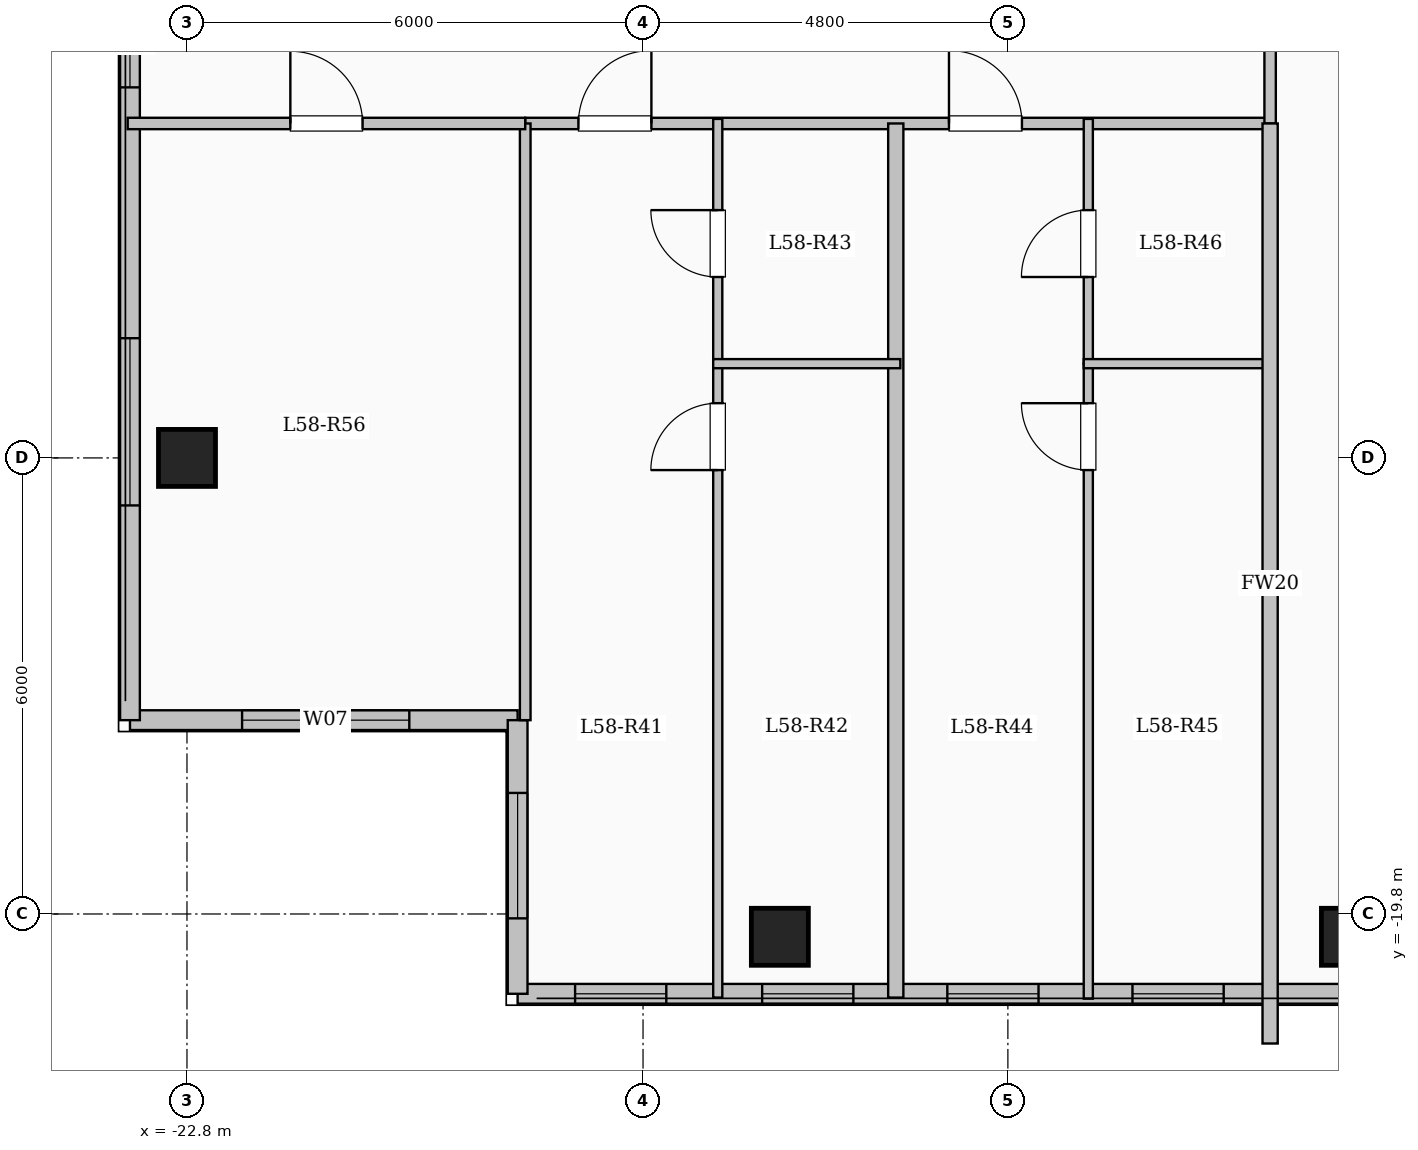
"""IFC4 building model, lengths in metres.
Left out: names, types, materials, properties, quantities, classifications, styles, units other than length and angle.
Written with IfcOpenShell. Run it as: python <this file> out.ifc"""

import sys

from ifc_helpers import new_model, si_unit, direction, frame, frame_2d, origin, origin_2d, place, context, subcontext, project, spatial, rectangle, extrude, element, fill, save


model = new_model("IFC4")
c1 = context("Model", 3, precision=1e-05, world=origin(), true_north=direction((0.0, 1.0)))
c2 = subcontext(c1, "Body", "Model", "MODEL_VIEW")
j1 = project(units=[si_unit("LENGTHUNIT", "METRE"), si_unit("PLANEANGLEUNIT", "RADIAN")], contexts=[c1])
p1 = place(None, origin())
s1 = spatial("IfcSite", under=j1, at=p1, CompositionType="ELEMENT")
p2 = place(p1, origin())
s2 = spatial("IfcBuilding", under=s1, at=p2, CompositionType="ELEMENT")
p3 = place(p2, frame((0.0, 0.0, 213.7)))
s3 = spatial("IfcBuildingStorey", under=s2, at=p3, CompositionType="ELEMENT", Elevation=213.7)
for number, where, z_axis, x_axis in (
    (1, (-15.0, -20.1, 0.0), (0.0, 0.0, 1.0), (1.0, 0.0, 0.0)),
    (2, (-7.5, -20.1, 0.0), (0.0, 0.0, 1.0), (1.0, 0.0, 0.0)),
    (3, (-22.8, -13.8, 0.0), (0.0, 0.0, 1.0), (1.0, 0.0, 0.0)),
):
    element("IfcColumn", number, at=place(p3, frame(where, z_axis=z_axis, x_axis=x_axis)), inside=s3, PredefinedType="COLUMN", context=c2, shape_type="SweptSolid", body=[
        extrude(rectangle(XDim=0.75, YDim=0.75, at=origin_2d()), origin(), (0.0, 0.0, 1.0), 3.35),
    ])
p4 = place(p3, frame((-18.45, -17.25, 0.0), z_axis=(0.0, 0.0, 1.0), x_axis=(-1.0, 0.0, 0.0)))
e4 = element("IfcWall", 4, at=p4, inside=s3, PredefinedType="SOLIDWALL", context=c2, shape_type="SweptSolid", body=[
    extrude(rectangle(XDim=5.1, YDim=0.26, at=frame_2d((2.55, 0.0))), origin(), (0.0, 0.0, 1.0), 3.1),
])
p5 = place(p4, frame((1.425, 0.0, 0.9)))
e5 = element("IfcOpeningElement", 5, at=p5, cuts=e4, PredefinedType="OPENING", context=c2, shape_type="SweptSolid", body=[
    extrude(rectangle(XDim=2.2, YDim=1.75, at=frame_2d((1.1, 0.875))), frame((0.0, 0.14, 0.0), z_axis=(0.0, -1.0, 0.0), x_axis=(1.0, 0.0, 0.0)), (0.0, 0.0, 1.0), 0.28),
])
p6 = place(p3, frame((-23.55, -17.25, 0.0), z_axis=(0.0, 0.0, 1.0), x_axis=(0.0, 1.0, 0.0)))
e6 = element("IfcWall", 6, at=p6, inside=s3, PredefinedType="SOLIDWALL", context=c2, shape_type="SweptSolid", body=[
    extrude(rectangle(XDim=34.5, YDim=0.26, at=frame_2d((17.25, 0.0))), origin(), (0.0, 0.0, 1.0), 3.1),
])
p7 = place(p6, frame((2.825, 0.0, 0.9)))
e7 = element("IfcOpeningElement", 7, at=p7, cuts=e6, PredefinedType="OPENING", context=c2, shape_type="SweptSolid", body=[
    extrude(rectangle(XDim=2.2, YDim=1.75, at=frame_2d((1.1, 0.875))), frame((0.0, 0.14, 0.0), z_axis=(0.0, -1.0, 0.0), x_axis=(1.0, 0.0, 0.0)), (0.0, 0.0, 1.0), 0.28),
])
p8 = place(p6, frame((8.325, 0.0, 0.95)))
e8 = element("IfcOpeningElement", 8, at=p8, cuts=e6, PredefinedType="OPENING", context=c2, shape_type="SweptSolid", body=[
    extrude(rectangle(XDim=1.2, YDim=1.5, at=frame_2d((0.6, 0.75))), frame((0.0, 0.14, 0.0), z_axis=(0.0, -1.0, 0.0), x_axis=(1.0, 0.0, 0.0)), (0.0, 0.0, 1.0), 0.28),
])
p9 = place(p6, frame((18.0, 0.0, 0.9)))
e9 = element("IfcOpeningElement", 9, at=p9, cuts=e6, PredefinedType="OPENING", context=c2, shape_type="SweptSolid", body=[
    extrude(rectangle(XDim=2.0, YDim=1.7, at=frame_2d((1.0, 0.85))), frame((0.0, 0.14, 0.0), z_axis=(0.0, -1.0, 0.0), x_axis=(1.0, 0.0, 0.0)), (0.0, 0.0, 1.0), 0.28),
])
p10 = place(p6, frame((28.375, 0.0, 0.95)))
e10 = element("IfcOpeningElement", 10, at=p10, cuts=e6, PredefinedType="OPENING", context=c2, shape_type="SweptSolid", body=[
    extrude(rectangle(XDim=1.0, YDim=1.5, at=frame_2d((0.5, 0.75))), frame((0.0, 0.14, 0.0), z_axis=(0.0, -1.0, 0.0), x_axis=(1.0, 0.0, 0.0)), (0.0, 0.0, 1.0), 0.28),
])
p11 = place(p6, frame((31.125, 0.0, 0.9)))
e11 = element("IfcOpeningElement", 11, at=p11, cuts=e6, PredefinedType="OPENING", context=c2, shape_type="SweptSolid", body=[
    extrude(rectangle(XDim=2.0, YDim=1.7, at=frame_2d((1.0, 0.85))), frame((0.0, 0.14, 0.0), z_axis=(0.0, -1.0, 0.0), x_axis=(1.0, 0.0, 0.0)), (0.0, 0.0, 1.0), 0.28),
])
p12 = place(p3, frame((-7.35, -20.85, 0.0), z_axis=(0.0, 0.0, 1.0), x_axis=(-1.0, 0.0, 0.0)))
e12 = element("IfcWall", 12, at=p12, inside=s3, PredefinedType="SOLIDWALL", context=c2, shape_type="SweptSolid", body=[
    extrude(rectangle(XDim=11.1, YDim=0.26, at=frame_2d((5.55, 0.0))), origin(), (0.0, 0.0, 1.0), 3.1),
])
p13 = place(p12, frame((1.811, 0.0, 0.95)))
e13 = element("IfcOpeningElement", 13, at=p13, cuts=e12, PredefinedType="OPENING", context=c2, shape_type="SweptSolid", body=[
    extrude(rectangle(XDim=1.2, YDim=1.5, at=frame_2d((0.6, 0.75))), frame((0.0, 0.14, 0.0), z_axis=(0.0, -1.0, 0.0), x_axis=(1.0, 0.0, 0.0)), (0.0, 0.0, 1.0), 0.28),
])
p14 = place(p12, frame((4.247, 0.0, 0.95)))
e14 = element("IfcOpeningElement", 14, at=p14, cuts=e12, PredefinedType="OPENING", context=c2, shape_type="SweptSolid", body=[
    extrude(rectangle(XDim=1.2, YDim=1.5, at=frame_2d((0.6, 0.75))), frame((0.0, 0.14, 0.0), z_axis=(0.0, -1.0, 0.0), x_axis=(1.0, 0.0, 0.0)), (0.0, 0.0, 1.0), 0.28),
])
p15 = place(p12, frame((6.683, 0.0, 0.95)))
e15 = element("IfcOpeningElement", 15, at=p15, cuts=e12, PredefinedType="OPENING", context=c2, shape_type="SweptSolid", body=[
    extrude(rectangle(XDim=1.2, YDim=1.5, at=frame_2d((0.6, 0.75))), frame((0.0, 0.14, 0.0), z_axis=(0.0, -1.0, 0.0), x_axis=(1.0, 0.0, 0.0)), (0.0, 0.0, 1.0), 0.28),
])
p16 = place(p12, frame((9.144, 0.0, 0.95)))
e16 = element("IfcOpeningElement", 16, at=p16, cuts=e12, PredefinedType="OPENING", context=c2, shape_type="SweptSolid", body=[
    extrude(rectangle(XDim=1.2, YDim=1.5, at=frame_2d((0.6, 0.75))), frame((0.0, 0.14, 0.0), z_axis=(0.0, -1.0, 0.0), x_axis=(1.0, 0.0, 0.0)), (0.0, 0.0, 1.0), 0.28),
])
p17 = place(p3, frame((-18.45, -20.85, 0.0), z_axis=(0.0, 0.0, 1.0), x_axis=(0.0, 1.0, 0.0)))
e17 = element("IfcWall", 17, at=p17, inside=s3, PredefinedType="SOLIDWALL", context=c2, shape_type="SweptSolid", body=[
    extrude(rectangle(XDim=3.6, YDim=0.26, at=frame_2d((1.8, 0.0))), origin(), (0.0, 0.0, 1.0), 3.1),
])
p18 = place(p17, frame((0.992, 0.0, 0.9)))
e18 = element("IfcOpeningElement", 18, at=p18, cuts=e17, PredefinedType="OPENING", context=c2, shape_type="SweptSolid", body=[
    extrude(rectangle(XDim=1.65, YDim=1.6, at=frame_2d((0.825, 0.8))), frame((0.0, 0.14, 0.0), z_axis=(0.0, -1.0, 0.0), x_axis=(1.0, 0.0, 0.0)), (0.0, 0.0, 1.0), 0.28),
])
p19 = place(p3, frame((-18.35, -9.4, 0.0), z_axis=(0.0, 0.0, 1.0), x_axis=(1.0, 0.0, 0.0)))
e19 = element("IfcWall", 19, at=p19, inside=s3, PredefinedType="PARTITIONING", context=c2, shape_type="SweptSolid", body=[
    extrude(rectangle(XDim=9.8, YDim=0.15, at=frame_2d((4.9, 0.0))), origin(), (0.0, 0.0, 1.0), 3.1),
])
p20 = place(p19, frame((0.7, 0.0, 0.0)))
e20 = element("IfcOpeningElement", 20, at=p20, cuts=e19, PredefinedType="OPENING", context=c2, shape_type="SweptSolid", body=[
    extrude(rectangle(XDim=0.96, YDim=2.15, at=frame_2d((0.48, 1.075))), frame((0.0, 0.085, 0.0), z_axis=(0.0, -1.0, 0.0), x_axis=(1.0, 0.0, 0.0)), (0.0, 0.0, 1.0), 0.17),
])
p21 = place(p19, frame((5.575, 0.0, 0.0)))
e21 = element("IfcOpeningElement", 21, at=p21, cuts=e19, PredefinedType="OPENING", context=c2, shape_type="SweptSolid", body=[
    extrude(rectangle(XDim=0.96, YDim=2.15, at=frame_2d((0.48, 1.075))), frame((0.0, 0.085, 0.0), z_axis=(0.0, -1.0, 0.0), x_axis=(1.0, 0.0, 0.0)), (0.0, 0.0, 1.0), 0.17),
])
p22 = place(p3, frame((-8.55, -9.4, 0.0), z_axis=(0.0, 0.0, 1.0), x_axis=(0.0, 1.0, 0.0)))
e22 = element("IfcWall", 22, at=p22, inside=s3, PredefinedType="PARTITIONING", context=c2, shape_type="SweptSolid", body=[
    extrude(rectangle(XDim=2.15, YDim=0.15, at=frame_2d((1.075, 0.0))), origin(), (0.0, 0.0, 1.0), 3.1),
])
p23 = place(p3, frame((-13.475, -20.9, 0.0), z_axis=(0.0, 0.0, 1.0), x_axis=(0.0, 1.0, 0.0)))
e23 = element("IfcWall", 23, at=p23, inside=s3, PredefinedType="SOLIDWALL", context=c2, shape_type="SweptSolid", body=[
    extrude(rectangle(XDim=11.5, YDim=0.2, at=frame_2d((5.75, 0.0))), origin(), (0.0, 0.0, 1.0), 3.1),
])
p24 = place(p3, frame((-15.817, -20.9, 0.0), z_axis=(0.0, 0.0, 1.0), x_axis=(0.0, 1.0, 0.0)))
e24 = element("IfcWall", 24, at=p24, inside=s3, PredefinedType="PARTITIONING", context=c2, shape_type="SweptSolid", body=[
    extrude(rectangle(XDim=8.34, YDim=0.12, at=frame_2d((4.17, 0.0))), origin(), (0.0, 0.0, 1.0), 3.1),
])
p25 = place(p24, frame((6.94, 0.0, 0.0)))
e25 = element("IfcOpeningElement", 25, at=p25, cuts=e24, PredefinedType="OPENING", context=c2, shape_type="SweptSolid", body=[
    extrude(rectangle(XDim=0.88, YDim=2.1, at=frame_2d((0.44, 1.05))), frame((0.0, 0.07, 0.0), z_axis=(0.0, -1.0, 0.0), x_axis=(1.0, 0.0, 0.0)), (0.0, 0.0, 1.0), 0.14),
])
p26 = place(p3, frame((-15.817, -12.56, 0.0), z_axis=(0.0, 0.0, 1.0), x_axis=(0.0, 1.0, 0.0)))
e26 = element("IfcWall", 26, at=p26, inside=s3, PredefinedType="PARTITIONING", context=c2, shape_type="SweptSolid", body=[
    extrude(rectangle(XDim=3.22, YDim=0.12, at=frame_2d((1.61, 0.0))), origin(), (0.0, 0.0, 1.0), 3.1),
])
p27 = place(p26, frame((1.14, 0.0, 0.0)))
e27 = element("IfcOpeningElement", 27, at=p27, cuts=e26, PredefinedType="OPENING", context=c2, shape_type="SweptSolid", body=[
    extrude(rectangle(XDim=0.88, YDim=2.1, at=frame_2d((0.44, 1.05))), frame((0.0, 0.07, 0.0), z_axis=(0.0, -1.0, 0.0), x_axis=(1.0, 0.0, 0.0)), (0.0, 0.0, 1.0), 0.14),
])
p28 = place(p3, frame((-15.877, -12.56, 0.0), z_axis=(0.0, 0.0, 1.0), x_axis=(1.0, 0.0, 0.0)))
e28 = element("IfcWall", 28, at=p28, inside=s3, PredefinedType="PARTITIONING", context=c2, shape_type="SweptSolid", body=[
    extrude(rectangle(XDim=2.462, YDim=0.12, at=frame_2d((1.231, 0.0))), origin(), (0.0, 0.0, 1.0), 2.725),
])
p29 = place(p3, frame((-10.942, -20.914, 0.0), z_axis=(0.0, 0.0, 1.0), x_axis=(0.0, 1.0, 0.0)))
e29 = element("IfcWall", 29, at=p29, inside=s3, PredefinedType="PARTITIONING", context=c2, shape_type="SweptSolid", body=[
    extrude(rectangle(XDim=8.354, YDim=0.12, at=frame_2d((4.177, 0.0))), origin(), (0.0, 0.0, 1.0), 3.1),
])
p30 = place(p29, frame((6.954, 0.0, 0.0)))
e30 = element("IfcOpeningElement", 30, at=p30, cuts=e29, PredefinedType="OPENING", context=c2, shape_type="SweptSolid", body=[
    extrude(rectangle(XDim=0.88, YDim=2.1, at=frame_2d((0.44, 1.05))), frame((0.0, 0.07, 0.0), z_axis=(0.0, -1.0, 0.0), x_axis=(1.0, 0.0, 0.0)), (0.0, 0.0, 1.0), 0.14),
])
p31 = place(p3, frame((-10.942, -12.56, 0.0), z_axis=(0.0, 0.0, 1.0), x_axis=(0.0, 1.0, 0.0)))
e31 = element("IfcWall", 31, at=p31, inside=s3, PredefinedType="PARTITIONING", context=c2, shape_type="SweptSolid", body=[
    extrude(rectangle(XDim=3.22, YDim=0.12, at=frame_2d((1.61, 0.0))), origin(), (0.0, 0.0, 1.0), 3.1),
])
p32 = place(p31, frame((1.14, 0.0, 0.0)))
e32 = element("IfcOpeningElement", 32, at=p32, cuts=e31, PredefinedType="OPENING", context=c2, shape_type="SweptSolid", body=[
    extrude(rectangle(XDim=0.88, YDim=2.1, at=frame_2d((0.44, 1.05))), frame((0.0, 0.07, 0.0), z_axis=(0.0, -1.0, 0.0), x_axis=(1.0, 0.0, 0.0)), (0.0, 0.0, 1.0), 0.14),
])
p33 = place(p3, frame((-11.002, -12.56, 0.0), z_axis=(0.0, 0.0, 1.0), x_axis=(1.0, 0.0, 0.0)))
e33 = element("IfcWall", 33, at=p33, inside=s3, PredefinedType="PARTITIONING", context=c2, shape_type="SweptSolid", body=[
    extrude(rectangle(XDim=2.462, YDim=0.12, at=frame_2d((1.231, 0.0))), origin(), (0.0, 0.0, 1.0), 2.725),
])
p34 = place(p3, frame((-8.55, -21.504, 0.0), z_axis=(0.0, 0.0, 1.0), x_axis=(0.0, 1.0, 0.0)))
e34 = element("IfcWall", 34, at=p34, inside=s3, PredefinedType="SOLIDWALL", context=c2, shape_type="SweptSolid", body=[
    extrude(rectangle(XDim=12.104, YDim=0.2, at=frame_2d((6.052, 0.0))), origin(), (0.0, 0.0, 1.0), 3.1),
])
p35 = place(p3, frame((-18.35, -17.25, 0.0), z_axis=(0.0, 0.0, 1.0), x_axis=(0.0, 1.0, 0.0)))
e35 = element("IfcWall", 35, at=p35, inside=s3, PredefinedType="PARTITIONING", context=c2, shape_type="SweptSolid", body=[
    extrude(rectangle(XDim=7.85, YDim=0.14, at=frame_2d((3.925, 0.0))), origin(), (0.0, 0.0, 1.0), 3.1),
])
p36 = place(p3, frame((-23.58, -9.4, 0.0), z_axis=(0.0, 0.0, 1.0), x_axis=(1.0, 0.0, 0.0)))
e36 = element("IfcWall", 36, at=p36, inside=s3, PredefinedType="PARTITIONING", context=c2, shape_type="SweptSolid", body=[
    extrude(rectangle(XDim=5.23, YDim=0.15, at=frame_2d((2.615, 0.0))), origin(), (0.0, 0.0, 1.0), 3.1),
])
p37 = place(p36, frame((2.14, 0.0, 0.0)))
e37 = element("IfcOpeningElement", 37, at=p37, cuts=e36, PredefinedType="OPENING", context=c2, shape_type="SweptSolid", body=[
    extrude(rectangle(XDim=0.95, YDim=2.15, at=frame_2d((0.475, 1.075))), frame((0.0, 0.085, 0.0), z_axis=(0.0, -1.0, 0.0), x_axis=(1.0, 0.0, 0.0)), (0.0, 0.0, 1.0), 0.17),
])
p38 = place(p5, origin())
e38 = element("IfcWindow", 38, at=p38, inside=s3, PartitioningType="SINGLE_PANEL", PredefinedType="WINDOW", context=c2, shape_type="SweptSolid", body=[
    extrude(rectangle(XDim=2.2, YDim=1.75, at=frame_2d((1.1, 0.875))), frame((0.0, 0.03, 0.0), z_axis=(0.0, -1.0, 0.0), x_axis=(1.0, 0.0, 0.0)), (0.0, 0.0, 1.0), 0.06),
])
fill(e5, e38)
p39 = place(p7, origin())
e39 = element("IfcWindow", 39, at=p39, inside=s3, PartitioningType="SINGLE_PANEL", PredefinedType="WINDOW", context=c2, shape_type="SweptSolid", body=[
    extrude(rectangle(XDim=2.2, YDim=1.75, at=frame_2d((1.1, 0.875))), frame((0.0, 0.03, 0.0), z_axis=(0.0, -1.0, 0.0), x_axis=(1.0, 0.0, 0.0)), (0.0, 0.0, 1.0), 0.06),
])
fill(e7, e39)
p40 = place(p8, origin())
e40 = element("IfcWindow", 40, at=p40, inside=s3, PartitioningType="SINGLE_PANEL", PredefinedType="WINDOW", context=c2, shape_type="SweptSolid", body=[
    extrude(rectangle(XDim=1.2, YDim=1.5, at=frame_2d((0.6, 0.75))), frame((0.0, 0.03, 0.0), z_axis=(0.0, -1.0, 0.0), x_axis=(1.0, 0.0, 0.0)), (0.0, 0.0, 1.0), 0.06),
])
fill(e8, e40)
p41 = place(p13, origin())
e41 = element("IfcWindow", 41, at=p41, inside=s3, PartitioningType="SINGLE_PANEL", PredefinedType="WINDOW", context=c2, shape_type="SweptSolid", body=[
    extrude(rectangle(XDim=1.2, YDim=1.5, at=frame_2d((0.6, 0.75))), frame((0.0, 0.03, 0.0), z_axis=(0.0, -1.0, 0.0), x_axis=(1.0, 0.0, 0.0)), (0.0, 0.0, 1.0), 0.06),
])
fill(e13, e41)
p42 = place(p14, origin())
e42 = element("IfcWindow", 42, at=p42, inside=s3, PartitioningType="SINGLE_PANEL", PredefinedType="WINDOW", context=c2, shape_type="SweptSolid", body=[
    extrude(rectangle(XDim=1.2, YDim=1.5, at=frame_2d((0.6, 0.75))), frame((0.0, 0.03, 0.0), z_axis=(0.0, -1.0, 0.0), x_axis=(1.0, 0.0, 0.0)), (0.0, 0.0, 1.0), 0.06),
])
fill(e14, e42)
p43 = place(p15, origin())
e43 = element("IfcWindow", 43, at=p43, inside=s3, PartitioningType="SINGLE_PANEL", PredefinedType="WINDOW", context=c2, shape_type="SweptSolid", body=[
    extrude(rectangle(XDim=1.2, YDim=1.5, at=frame_2d((0.6, 0.75))), frame((0.0, 0.03, 0.0), z_axis=(0.0, -1.0, 0.0), x_axis=(1.0, 0.0, 0.0)), (0.0, 0.0, 1.0), 0.06),
])
fill(e15, e43)
p44 = place(p16, origin())
e44 = element("IfcWindow", 44, at=p44, inside=s3, PartitioningType="SINGLE_PANEL", PredefinedType="WINDOW", context=c2, shape_type="SweptSolid", body=[
    extrude(rectangle(XDim=1.2, YDim=1.5, at=frame_2d((0.6, 0.75))), frame((0.0, 0.03, 0.0), z_axis=(0.0, -1.0, 0.0), x_axis=(1.0, 0.0, 0.0)), (0.0, 0.0, 1.0), 0.06),
])
fill(e16, e44)
p45 = place(p18, origin())
e45 = element("IfcWindow", 45, at=p45, inside=s3, PartitioningType="SINGLE_PANEL", PredefinedType="WINDOW", context=c2, shape_type="SweptSolid", body=[
    extrude(rectangle(XDim=1.65, YDim=1.6, at=frame_2d((0.825, 0.8))), frame((0.0, 0.03, 0.0), z_axis=(0.0, -1.0, 0.0), x_axis=(1.0, 0.0, 0.0)), (0.0, 0.0, 1.0), 0.06),
])
fill(e18, e45)
p46 = place(p20, origin())
e46 = element("IfcDoor", 46, at=p46, inside=s3, OperationType="SINGLE_SWING_RIGHT", PredefinedType="DOOR", context=c2, shape_type="SweptSolid", body=[
    extrude(rectangle(XDim=0.96, YDim=2.15, at=frame_2d((0.48, 1.075))), frame((0.0, 0.025, 0.0), z_axis=(0.0, -1.0, 0.0), x_axis=(1.0, 0.0, 0.0)), (0.0, 0.0, 1.0), 0.05),
])
fill(e20, e46)
p47 = place(p25, origin())
e47 = element("IfcDoor", 47, at=p47, inside=s3, OperationType="SINGLE_SWING_LEFT", PredefinedType="DOOR", context=c2, shape_type="SweptSolid", body=[
    extrude(rectangle(XDim=0.88, YDim=2.1, at=frame_2d((0.44, 1.05))), frame((0.0, 0.025, 0.0), z_axis=(0.0, -1.0, 0.0), x_axis=(1.0, 0.0, 0.0)), (0.0, 0.0, 1.0), 0.05),
])
fill(e25, e47)
p48 = place(p27, origin())
e48 = element("IfcDoor", 48, at=p48, inside=s3, OperationType="SINGLE_SWING_RIGHT", PredefinedType="DOOR", context=c2, shape_type="SweptSolid", body=[
    extrude(rectangle(XDim=0.88, YDim=2.1, at=frame_2d((0.44, 1.05))), frame((0.0, 0.025, 0.0), z_axis=(0.0, -1.0, 0.0), x_axis=(1.0, 0.0, 0.0)), (0.0, 0.0, 1.0), 0.05),
])
fill(e27, e48)
p49 = place(p21, origin())
e49 = element("IfcDoor", 49, at=p49, inside=s3, OperationType="SINGLE_SWING_LEFT", PredefinedType="DOOR", context=c2, shape_type="SweptSolid", body=[
    extrude(rectangle(XDim=0.96, YDim=2.15, at=frame_2d((0.48, 1.075))), frame((0.0, 0.025, 0.0), z_axis=(0.0, -1.0, 0.0), x_axis=(1.0, 0.0, 0.0)), (0.0, 0.0, 1.0), 0.05),
])
fill(e21, e49)
p50 = place(p30, origin())
e50 = element("IfcDoor", 50, at=p50, inside=s3, OperationType="SINGLE_SWING_RIGHT", PredefinedType="DOOR", context=c2, shape_type="SweptSolid", body=[
    extrude(rectangle(XDim=0.88, YDim=2.1, at=frame_2d((0.44, 1.05))), frame((0.0, 0.025, 0.0), z_axis=(0.0, -1.0, 0.0), x_axis=(1.0, 0.0, 0.0)), (0.0, 0.0, 1.0), 0.05),
])
fill(e30, e50)
p51 = place(p32, origin())
e51 = element("IfcDoor", 51, at=p51, inside=s3, OperationType="SINGLE_SWING_LEFT", PredefinedType="DOOR", context=c2, shape_type="SweptSolid", body=[
    extrude(rectangle(XDim=0.88, YDim=2.1, at=frame_2d((0.44, 1.05))), frame((0.0, 0.025, 0.0), z_axis=(0.0, -1.0, 0.0), x_axis=(1.0, 0.0, 0.0)), (0.0, 0.0, 1.0), 0.05),
])
fill(e32, e51)
p52 = place(p37, origin())
e52 = element("IfcDoor", 52, at=p52, inside=s3, OperationType="SINGLE_SWING_LEFT", PredefinedType="DOOR", context=c2, shape_type="SweptSolid", body=[
    extrude(rectangle(XDim=0.95, YDim=2.15, at=frame_2d((0.475, 1.075))), frame((0.0, 0.025, 0.0), z_axis=(0.0, -1.0, 0.0), x_axis=(1.0, 0.0, 0.0)), (0.0, 0.0, 1.0), 0.05),
])
fill(e37, e52)
save(model, sys.argv[1])
